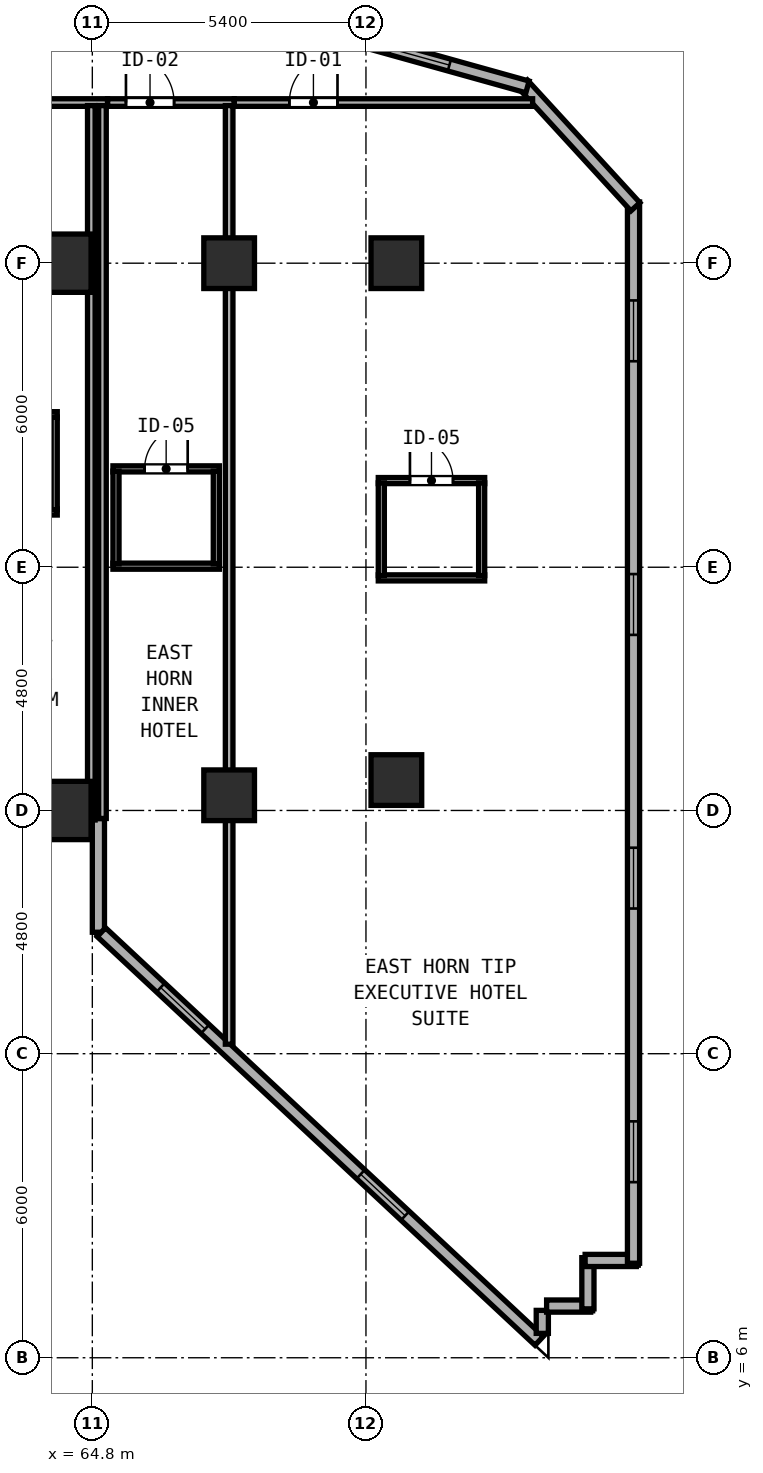
"""IFC4 building model, lengths in metres.
Left out: names, types, materials, properties, quantities, classifications, styles, units other than length and angle.
Written with IfcOpenShell. Run it as: python <this file> out.ifc"""

import sys

from ifc_helpers import new_model, si_unit, direction, frame, frame_2d, origin, origin_2d, place, context, subcontext, project, spatial, rectangle, hollow_rectangle, extrude, element, fill, save


model = new_model("IFC4")
c1 = context("Model", 3, precision=1e-05, world=origin(), true_north=direction((0.0, 1.0)))
c2 = subcontext(c1, "Body", "Model", "MODEL_VIEW")
j1 = project(units=[si_unit("LENGTHUNIT", "METRE"), si_unit("PLANEANGLEUNIT", "RADIAN")], contexts=[c1])
p1 = place(None, origin())
s1 = spatial("IfcSite", under=j1, at=p1, CompositionType="ELEMENT")
p2 = place(p1, origin())
s2 = spatial("IfcBuilding", under=s1, at=p2, CompositionType="ELEMENT")
p3 = place(p2, frame((0.0, 0.0, 85.6)))
s3 = spatial("IfcBuildingStorey", under=s2, at=p3, CompositionType="ELEMENT", Elevation=85.6)
for number, where, z_axis, x_axis in (
    (1, (64.2, 16.8, 0.0), (0.0, 0.0, 1.0), (1.0, 0.0, 0.0)),
    (2, (64.2, 27.6, 0.0), (0.0, 0.0, 1.0), (1.0, 0.0, 0.0)),
):
    element("IfcColumn", number, at=place(p3, frame(where, z_axis=z_axis, x_axis=x_axis)), inside=s3, PredefinedType="COLUMN", context=c2, shape_type="SweptSolid", body=[
        extrude(hollow_rectangle(XDim=1.15, YDim=1.15, WallThickness=0.042, at=origin_2d()), origin(), (0.0, 0.0, 1.0), 3.8),
    ])
for number, where, z_axis, x_axis in (
    (3, (70.8, 17.4, 0.0), (0.0, 0.0, 1.0), (1.0, 0.0, 0.0)),
    (4, (70.8, 27.6, 0.0), (0.0, 0.0, 1.0), (1.0, 0.0, 0.0)),
    (5, (67.5, 17.1, 0.0), (0.0, 0.0, 1.0), (1.0, 0.0, 0.0)),
    (6, (67.5, 27.6, 0.0), (0.0, 0.0, 1.0), (1.0, 0.0, 0.0)),
):
    element("IfcColumn", number, at=place(p3, frame(where, z_axis=z_axis, x_axis=x_axis)), inside=s3, PredefinedType="COLUMN", context=c2, shape_type="SweptSolid", body=[
        extrude(hollow_rectangle(XDim=1.0, YDim=1.0, WallThickness=0.038, at=origin_2d()), origin(), (0.0, 0.0, 1.0), 3.8),
    ])
p4 = place(p3, frame((64.92, 16.64, 0.0), z_axis=(0.0, 0.0, 1.0), x_axis=(0.0, -1.0, 0.0)))
e7 = element("IfcWall", 7, at=p4, inside=s3, PredefinedType="SOLIDWALL", context=c2, shape_type="SweptSolid", body=[
    extrude(rectangle(XDim=2.243, YDim=0.24, at=frame_2d((1.121, 0.0))), origin(), (0.0, 0.0, 1.0), 3.54),
])
p5 = place(p3, frame((64.979, 14.397, 0.0), z_axis=(0.0, 0.0, 1.0), x_axis=(0.731053894258, -0.682319722484, 0.0)))
e8 = element("IfcWall", 8, at=p5, inside=s3, PredefinedType="SOLIDWALL", context=c2, shape_type="SweptSolid", body=[
    extrude(rectangle(XDim=11.818, YDim=0.24, at=frame_2d((5.909, 0.0))), origin(), (0.0, 0.0, 1.0), 3.54),
])
p6 = place(p5, frame((1.6, 0.0, 0.85)))
e9 = element("IfcOpeningElement", 9, at=p6, cuts=e8, PredefinedType="OPENING", context=c2, shape_type="SweptSolid", body=[
    extrude(rectangle(XDim=1.2, YDim=1.85, at=frame_2d((0.6, 0.925))), frame((0.0, 0.13, 0.0), z_axis=(0.0, -1.0, 0.0), x_axis=(1.0, 0.0, 0.0)), (0.0, 0.0, 1.0), 0.26),
])
p7 = place(p5, frame((7.0, 0.0, 0.85)))
e10 = element("IfcOpeningElement", 10, at=p7, cuts=e8, PredefinedType="OPENING", context=c2, shape_type="SweptSolid", body=[
    extrude(rectangle(XDim=1.2, YDim=1.85, at=frame_2d((0.6, 0.925))), frame((0.0, 0.13, 0.0), z_axis=(0.0, -1.0, 0.0), x_axis=(1.0, 0.0, 0.0)), (0.0, 0.0, 1.0), 0.26),
])
p8 = place(p3, frame((73.68, 6.481, 0.0), z_axis=(0.0, 0.0, 1.0), x_axis=(0.0, 1.0, 0.0)))
e11 = element("IfcWall", 11, at=p8, inside=s3, PredefinedType="SOLIDWALL", context=c2, shape_type="SweptSolid", body=[
    extrude(rectangle(XDim=0.454, YDim=0.24, at=frame_2d((0.227, 0.0))), origin(), (0.0, 0.0, 1.0), 3.54),
])
p9 = place(p3, frame((73.765, 7.02, 0.0), z_axis=(0.0, 0.0, 1.0), x_axis=(1.0, 0.0, 0.0)))
e12 = element("IfcWall", 12, at=p9, inside=s3, PredefinedType="SOLIDWALL", context=c2, shape_type="SweptSolid", body=[
    extrude(rectangle(XDim=0.87, YDim=0.24, at=frame_2d((0.435, 0.0))), origin(), (0.0, 0.0, 1.0), 3.54),
])
for number, where, z_axis, x_axis in (
    (13, (74.58, 6.965, 0.0), (0.0, 0.0, 1.0), (0.0, 1.0, 0.0)),
    (14, (74.525, 7.92, 0.0), (0.0, 0.0, 1.0), (1.0, 0.0, 0.0)),
):
    element("IfcWall", number, at=place(p3, frame(where, z_axis=z_axis, x_axis=x_axis)), inside=s3, PredefinedType="SOLIDWALL", context=c2, shape_type="SweptSolid", body=[
        extrude(rectangle(XDim=1.01, YDim=0.24, at=frame_2d((0.505, 0.0))), origin(), (0.0, 0.0, 1.0), 3.54),
    ])
p10 = place(p3, frame((75.48, 7.865, 0.0), z_axis=(0.0, 0.0, 1.0), x_axis=(0.0, 1.0, 0.0)))
e15 = element("IfcWall", 15, at=p10, inside=s3, PredefinedType="SOLIDWALL", context=c2, shape_type="SweptSolid", body=[
    extrude(rectangle(XDim=20.943, YDim=0.24, at=frame_2d((10.472, 0.0))), origin(), (0.0, 0.0, 1.0), 3.54),
])
p11 = place(p10, frame((1.6, 0.0, 0.85)))
e16 = element("IfcOpeningElement", 16, at=p11, cuts=e15, PredefinedType="OPENING", context=c2, shape_type="SweptSolid", body=[
    extrude(rectangle(XDim=1.2, YDim=1.85, at=frame_2d((0.6, 0.925))), frame((0.0, 0.13, 0.0), z_axis=(0.0, -1.0, 0.0), x_axis=(1.0, 0.0, 0.0)), (0.0, 0.0, 1.0), 0.26),
])
p12 = place(p10, frame((7.0, 0.0, 0.85)))
e17 = element("IfcOpeningElement", 17, at=p12, cuts=e15, PredefinedType="OPENING", context=c2, shape_type="SweptSolid", body=[
    extrude(rectangle(XDim=1.2, YDim=1.85, at=frame_2d((0.6, 0.925))), frame((0.0, 0.13, 0.0), z_axis=(0.0, -1.0, 0.0), x_axis=(1.0, 0.0, 0.0)), (0.0, 0.0, 1.0), 0.26),
])
p13 = place(p10, frame((12.4, 0.0, 0.85)))
e18 = element("IfcOpeningElement", 18, at=p13, cuts=e15, PredefinedType="OPENING", context=c2, shape_type="SweptSolid", body=[
    extrude(rectangle(XDim=1.2, YDim=1.85, at=frame_2d((0.6, 0.925))), frame((0.0, 0.13, 0.0), z_axis=(0.0, -1.0, 0.0), x_axis=(1.0, 0.0, 0.0)), (0.0, 0.0, 1.0), 0.26),
])
p14 = place(p10, frame((17.8, 0.0, 0.85)))
e19 = element("IfcOpeningElement", 19, at=p14, cuts=e15, PredefinedType="OPENING", context=c2, shape_type="SweptSolid", body=[
    extrude(rectangle(XDim=1.2, YDim=1.85, at=frame_2d((0.6, 0.925))), frame((0.0, 0.13, 0.0), z_axis=(0.0, -1.0, 0.0), x_axis=(1.0, 0.0, 0.0)), (0.0, 0.0, 1.0), 0.26),
])
p15 = place(p3, frame((75.517, 28.713, 0.0), z_axis=(0.0, 0.0, 1.0), x_axis=(-0.67574145796, 0.737138712858, 0.0)))
e20 = element("IfcWall", 20, at=p15, inside=s3, PredefinedType="SOLIDWALL", context=c2, shape_type="SweptSolid", body=[
    extrude(rectangle(XDim=3.284, YDim=0.24, at=frame_2d((1.642, 0.0))), origin(), (0.0, 0.0, 1.0), 3.54),
])
p16 = place(p3, frame((73.388, 31.079, 0.0), z_axis=(0.0, 0.0, 1.0), x_axis=(-0.963197271032, 0.268795493036, 0.0)))
e21 = element("IfcWall", 21, at=p16, inside=s3, PredefinedType="SOLIDWALL", context=c2, shape_type="SweptSolid", body=[
    extrude(rectangle(XDim=9.095, YDim=0.24, at=frame_2d((4.548, 0.0))), origin(), (0.0, 0.0, 1.0), 3.54),
])
p17 = place(p16, frame((1.6, 0.0, 0.85)))
e22 = element("IfcOpeningElement", 22, at=p17, cuts=e21, PredefinedType="OPENING", context=c2, shape_type="SweptSolid", body=[
    extrude(rectangle(XDim=1.2, YDim=1.85, at=frame_2d((0.6, 0.925))), frame((0.0, 0.13, 0.0), z_axis=(0.0, -1.0, 0.0), x_axis=(1.0, 0.0, 0.0)), (0.0, 0.0, 1.0), 0.26),
])
p18 = place(p16, frame((7.0, 0.0, 0.85)))
e23 = element("IfcOpeningElement", 23, at=p18, cuts=e21, PredefinedType="OPENING", context=c2, shape_type="SweptSolid", body=[
    extrude(rectangle(XDim=1.2, YDim=1.85, at=frame_2d((0.6, 0.925))), frame((0.0, 0.13, 0.0), z_axis=(0.0, -1.0, 0.0), x_axis=(1.0, 0.0, 0.0)), (0.0, 0.0, 1.0), 0.26),
])
p19 = place(p3, frame((61.202, 30.77, 0.0), z_axis=(0.0, 0.0, 1.0), x_axis=(1.0, 0.0, 0.0)))
e24 = element("IfcWall", 24, at=p19, inside=s3, PredefinedType="PARTITIONING", context=c2, shape_type="SweptSolid", body=[
    extrude(rectangle(XDim=3.898, YDim=0.15, at=frame_2d((1.949, 0.0))), origin(), (0.0, 0.0, 1.0), 3.54),
])
p20 = place(p19, frame((1.09, 0.0, 0.0), z_axis=(0.0, 0.0, 1.0), x_axis=(-1.0, 0.0, 0.0)))
e25 = element("IfcOpeningElement", 25, at=p20, cuts=e24, PredefinedType="OPENING", context=c2, shape_type="SweptSolid", body=[
    extrude(rectangle(XDim=0.95, YDim=2.15, at=frame_2d((0.475, 1.075))), frame((0.0, 0.085, 0.0), z_axis=(0.0, -1.0, 0.0), x_axis=(1.0, 0.0, 0.0)), (0.0, 0.0, 1.0), 0.17),
])
p21 = place(p3, frame((65.0, 16.642, 0.0), z_axis=(0.0, 0.0, 1.0), x_axis=(0.0, 1.0, 0.0)))
e26 = element("IfcWall", 26, at=p21, inside=s3, PredefinedType="PARTITIONING", context=c2, shape_type="SweptSolid", body=[
    extrude(rectangle(XDim=14.068, YDim=0.15, at=frame_2d((7.034, 0.0))), origin(), (0.0, 0.0, 1.0), 3.54),
])
p22 = place(p3, frame((62.008, 24.61, 0.0), z_axis=(0.0, 0.0, 1.0), x_axis=(1.0, 0.0, 0.0)))
e27 = element("IfcWall", 27, at=p22, inside=s3, PredefinedType="PARTITIONING", context=c2, shape_type="SweptSolid", body=[
    extrude(rectangle(XDim=2.1, YDim=0.12, at=frame_2d((1.05, 0.0))), origin(), (0.0, 0.0, 1.0), 3.54),
])
p23 = place(p22, frame((1.475, 0.0, 0.0), z_axis=(0.0, 0.0, 1.0), x_axis=(-1.0, 0.0, 0.0)))
e28 = element("IfcOpeningElement", 28, at=p23, cuts=e27, PredefinedType="OPENING", context=c2, shape_type="SweptSolid", body=[
    extrude(rectangle(XDim=0.85, YDim=2.1, at=frame_2d((0.425, 1.05))), frame((0.0, 0.07, 0.0), z_axis=(0.0, -1.0, 0.0), x_axis=(1.0, 0.0, 0.0)), (0.0, 0.0, 1.0), 0.14),
])
p24 = place(p3, frame((62.008, 22.69, 0.0), z_axis=(0.0, 0.0, 1.0), x_axis=(1.0, 0.0, 0.0)))
e29 = element("IfcWall", 29, at=p24, inside=s3, PredefinedType="PARTITIONING", context=c2, shape_type="SweptSolid", body=[
    extrude(rectangle(XDim=2.1, YDim=0.12, at=frame_2d((1.05, 0.0))), origin(), (0.0, 0.0, 1.0), 3.54),
])
p25 = place(p3, frame((64.048, 22.735, 0.0), z_axis=(0.0, 0.0, 1.0), x_axis=(0.0, 1.0, 0.0)))
e30 = element("IfcWall", 30, at=p25, inside=s3, PredefinedType="PARTITIONING", context=c2, shape_type="SweptSolid", body=[
    extrude(rectangle(XDim=1.83, YDim=0.12, at=frame_2d((0.915, 0.0))), origin(), (0.0, 0.0, 1.0), 3.037),
])
p26 = place(p3, frame((65.102, 30.77, 0.0), z_axis=(0.0, 0.0, 1.0), x_axis=(1.0, 0.0, 0.0)))
e31 = element("IfcWall", 31, at=p26, inside=s3, PredefinedType="PARTITIONING", context=c2, shape_type="SweptSolid", body=[
    extrude(rectangle(XDim=2.498, YDim=0.15, at=frame_2d((1.249, 0.0))), origin(), (0.0, 0.0, 1.0), 3.54),
])
p27 = place(p26, frame((1.312, 0.0, 0.0), z_axis=(0.0, 0.0, 1.0), x_axis=(-1.0, 0.0, 0.0)))
e32 = element("IfcOpeningElement", 32, at=p27, cuts=e31, PredefinedType="OPENING", context=c2, shape_type="SweptSolid", body=[
    extrude(rectangle(XDim=0.95, YDim=2.15, at=frame_2d((0.475, 1.075))), frame((0.0, 0.085, 0.0), z_axis=(0.0, -1.0, 0.0), x_axis=(1.0, 0.0, 0.0)), (0.0, 0.0, 1.0), 0.17),
])
p28 = place(p3, frame((67.5, 12.188, 0.0), z_axis=(0.0, 0.0, 1.0), x_axis=(0.0, 1.0, 0.0)))
e33 = element("IfcWall", 33, at=p28, inside=s3, PredefinedType="PARTITIONING", context=c2, shape_type="SweptSolid", body=[
    extrude(rectangle(XDim=18.522, YDim=0.15, at=frame_2d((9.261, 0.0))), origin(), (0.0, 0.0, 1.0), 3.54),
])
p29 = place(p3, frame((64.78, 16.612, 0.0), z_axis=(0.0, 0.0, 1.0), x_axis=(0.0, 1.0, 0.0)))
e34 = element("IfcWall", 34, at=p29, inside=s3, PredefinedType="PARTITIONING", context=c2, shape_type="SweptSolid", body=[
    extrude(rectangle(XDim=14.098, YDim=0.15, at=frame_2d((7.049, 0.0))), origin(), (0.0, 0.0, 1.0), 3.54),
])
p30 = place(p3, frame((65.207, 23.541, 0.0), z_axis=(0.0, 0.0, 1.0), x_axis=(1.0, 0.0, 0.0)))
e35 = element("IfcWall", 35, at=p30, inside=s3, PredefinedType="PARTITIONING", context=c2, shape_type="SweptSolid", body=[
    extrude(rectangle(XDim=2.1, YDim=0.12, at=frame_2d((1.05, 0.0))), origin(), (0.0, 0.0, 1.0), 3.54),
])
p31 = place(p30, frame((1.475, 0.0, 0.0), z_axis=(0.0, 0.0, 1.0), x_axis=(-1.0, 0.0, 0.0)))
e36 = element("IfcOpeningElement", 36, at=p31, cuts=e35, PredefinedType="OPENING", context=c2, shape_type="SweptSolid", body=[
    extrude(rectangle(XDim=0.85, YDim=2.1, at=frame_2d((0.425, 1.05))), frame((0.0, 0.07, 0.0), z_axis=(0.0, -1.0, 0.0), x_axis=(1.0, 0.0, 0.0)), (0.0, 0.0, 1.0), 0.14),
])
p32 = place(p3, frame((65.207, 21.621, 0.0), z_axis=(0.0, 0.0, 1.0), x_axis=(1.0, 0.0, 0.0)))
e37 = element("IfcWall", 37, at=p32, inside=s3, PredefinedType="PARTITIONING", context=c2, shape_type="SweptSolid", body=[
    extrude(rectangle(XDim=2.1, YDim=0.12, at=frame_2d((1.05, 0.0))), origin(), (0.0, 0.0, 1.0), 3.54),
])
for number, where, z_axis, x_axis in (
    (38, (65.267, 21.666, 0.0), (0.0, 0.0, 1.0), (0.0, 1.0, 0.0)),
    (39, (67.247, 21.666, 0.0), (0.0, 0.0, 1.0), (0.0, 1.0, 0.0)),
):
    element("IfcWall", number, at=place(p3, frame(where, z_axis=z_axis, x_axis=x_axis)), inside=s3, PredefinedType="PARTITIONING", context=c2, shape_type="SweptSolid", body=[
        extrude(rectangle(XDim=1.83, YDim=0.12, at=frame_2d((0.915, 0.0))), origin(), (0.0, 0.0, 1.0), 3.54),
    ])
p33 = place(p3, frame((67.602, 30.77, 0.0), z_axis=(0.0, 0.0, 1.0), x_axis=(1.0, 0.0, 0.0)))
e40 = element("IfcWall", 40, at=p33, inside=s3, PredefinedType="PARTITIONING", context=c2, shape_type="SweptSolid", body=[
    extrude(rectangle(XDim=5.887, YDim=0.15, at=frame_2d((2.943, 0.0))), origin(), (0.0, 0.0, 1.0), 3.54),
])
p34 = place(p33, frame((2.036, 0.0, 0.0), z_axis=(0.0, 0.0, 1.0), x_axis=(-1.0, 0.0, 0.0)))
e41 = element("IfcOpeningElement", 41, at=p34, cuts=e40, PredefinedType="OPENING", context=c2, shape_type="SweptSolid", body=[
    extrude(rectangle(XDim=0.95, YDim=2.18, at=frame_2d((0.475, 1.09))), frame((0.0, 0.085, 0.0), z_axis=(0.0, -1.0, 0.0), x_axis=(1.0, 0.0, 0.0)), (0.0, 0.0, 1.0), 0.17),
])
p35 = place(p3, frame((70.443, 23.31, 0.0), z_axis=(0.0, 0.0, 1.0), x_axis=(1.0, 0.0, 0.0)))
e42 = element("IfcWall", 42, at=p35, inside=s3, PredefinedType="PARTITIONING", context=c2, shape_type="SweptSolid", body=[
    extrude(rectangle(XDim=2.1, YDim=0.12, at=frame_2d((1.05, 0.0))), origin(), (0.0, 0.0, 1.0), 3.54),
])
p36 = place(p35, frame((1.475, 0.0, 0.0), z_axis=(0.0, 0.0, 1.0), x_axis=(-1.0, 0.0, 0.0)))
e43 = element("IfcOpeningElement", 43, at=p36, cuts=e42, PredefinedType="OPENING", context=c2, shape_type="SweptSolid", body=[
    extrude(rectangle(XDim=0.85, YDim=2.1, at=frame_2d((0.425, 1.05))), frame((0.0, 0.07, 0.0), z_axis=(0.0, -1.0, 0.0), x_axis=(1.0, 0.0, 0.0)), (0.0, 0.0, 1.0), 0.14),
])
p37 = place(p3, frame((70.443, 21.39, 0.0), z_axis=(0.0, 0.0, 1.0), x_axis=(1.0, 0.0, 0.0)))
e44 = element("IfcWall", 44, at=p37, inside=s3, PredefinedType="PARTITIONING", context=c2, shape_type="SweptSolid", body=[
    extrude(rectangle(XDim=2.1, YDim=0.12, at=frame_2d((1.05, 0.0))), origin(), (0.0, 0.0, 1.0), 3.54),
])
for number, where, z_axis, x_axis in (
    (45, (70.503, 21.435, 0.0), (0.0, 0.0, 1.0), (0.0, 1.0, 0.0)),
    (46, (72.483, 21.435, 0.0), (0.0, 0.0, 1.0), (0.0, 1.0, 0.0)),
):
    element("IfcWall", number, at=place(p3, frame(where, z_axis=z_axis, x_axis=x_axis)), inside=s3, PredefinedType="PARTITIONING", context=c2, shape_type="SweptSolid", body=[
        extrude(rectangle(XDim=1.83, YDim=0.12, at=frame_2d((0.915, 0.0))), origin(), (0.0, 0.0, 1.0), 3.54),
    ])
p38 = place(p6, origin())
e47 = element("IfcWindow", 47, at=p38, inside=s3, PartitioningType="SINGLE_PANEL", PredefinedType="WINDOW", context=c2, shape_type="SweptSolid", body=[
    extrude(rectangle(XDim=1.2, YDim=1.85, at=frame_2d((0.6, 0.925))), frame((0.0, 0.03, 0.0), z_axis=(0.0, -1.0, 0.0), x_axis=(1.0, 0.0, 0.0)), (0.0, 0.0, 1.0), 0.06),
])
fill(e9, e47)
p39 = place(p7, origin())
e48 = element("IfcWindow", 48, at=p39, inside=s3, PartitioningType="SINGLE_PANEL", PredefinedType="WINDOW", context=c2, shape_type="SweptSolid", body=[
    extrude(rectangle(XDim=1.2, YDim=1.85, at=frame_2d((0.6, 0.925))), frame((0.0, 0.03, 0.0), z_axis=(0.0, -1.0, 0.0), x_axis=(1.0, 0.0, 0.0)), (0.0, 0.0, 1.0), 0.06),
])
fill(e10, e48)
p40 = place(p11, origin())
e49 = element("IfcWindow", 49, at=p40, inside=s3, PartitioningType="SINGLE_PANEL", PredefinedType="WINDOW", context=c2, shape_type="SweptSolid", body=[
    extrude(rectangle(XDim=1.2, YDim=1.85, at=frame_2d((0.6, 0.925))), frame((0.0, 0.03, 0.0), z_axis=(0.0, -1.0, 0.0), x_axis=(1.0, 0.0, 0.0)), (0.0, 0.0, 1.0), 0.06),
])
fill(e16, e49)
p41 = place(p12, origin())
e50 = element("IfcWindow", 50, at=p41, inside=s3, PartitioningType="SINGLE_PANEL", PredefinedType="WINDOW", context=c2, shape_type="SweptSolid", body=[
    extrude(rectangle(XDim=1.2, YDim=1.85, at=frame_2d((0.6, 0.925))), frame((0.0, 0.03, 0.0), z_axis=(0.0, -1.0, 0.0), x_axis=(1.0, 0.0, 0.0)), (0.0, 0.0, 1.0), 0.06),
])
fill(e17, e50)
p42 = place(p13, origin())
e51 = element("IfcWindow", 51, at=p42, inside=s3, PartitioningType="SINGLE_PANEL", PredefinedType="WINDOW", context=c2, shape_type="SweptSolid", body=[
    extrude(rectangle(XDim=1.2, YDim=1.85, at=frame_2d((0.6, 0.925))), frame((0.0, 0.03, 0.0), z_axis=(0.0, -1.0, 0.0), x_axis=(1.0, 0.0, 0.0)), (0.0, 0.0, 1.0), 0.06),
])
fill(e18, e51)
p43 = place(p14, origin())
e52 = element("IfcWindow", 52, at=p43, inside=s3, PartitioningType="SINGLE_PANEL", PredefinedType="WINDOW", context=c2, shape_type="SweptSolid", body=[
    extrude(rectangle(XDim=1.2, YDim=1.85, at=frame_2d((0.6, 0.925))), frame((0.0, 0.03, 0.0), z_axis=(0.0, -1.0, 0.0), x_axis=(1.0, 0.0, 0.0)), (0.0, 0.0, 1.0), 0.06),
])
fill(e19, e52)
p44 = place(p17, origin())
e53 = element("IfcWindow", 53, at=p44, inside=s3, PartitioningType="SINGLE_PANEL", PredefinedType="WINDOW", context=c2, shape_type="SweptSolid", body=[
    extrude(rectangle(XDim=1.2, YDim=1.85, at=frame_2d((0.6, 0.925))), frame((0.0, 0.03, 0.0), z_axis=(0.0, -1.0, 0.0), x_axis=(1.0, 0.0, 0.0)), (0.0, 0.0, 1.0), 0.06),
])
fill(e22, e53)
p45 = place(p27, origin())
e54 = element("IfcDoor", 54, at=p45, inside=s3, OperationType="SINGLE_SWING_RIGHT", PredefinedType="DOOR", context=c2, shape_type="SweptSolid", body=[
    extrude(rectangle(XDim=0.95, YDim=2.15, at=frame_2d((0.475, 1.075))), frame((0.0, 0.025, 0.0), z_axis=(0.0, -1.0, 0.0), x_axis=(1.0, 0.0, 0.0)), (0.0, 0.0, 1.0), 0.05),
])
fill(e32, e54)
p46 = place(p31, origin())
e55 = element("IfcDoor", 55, at=p46, inside=s3, OperationType="SINGLE_SWING_LEFT", PredefinedType="DOOR", context=c2, shape_type="SweptSolid", body=[
    extrude(rectangle(XDim=0.85, YDim=2.1, at=frame_2d((0.425, 1.05))), frame((0.0, 0.025, 0.0), z_axis=(0.0, -1.0, 0.0), x_axis=(1.0, 0.0, 0.0)), (0.0, 0.0, 1.0), 0.05),
])
fill(e36, e55)
p47 = place(p34, origin())
e56 = element("IfcDoor", 56, at=p47, inside=s3, OperationType="SINGLE_SWING_LEFT", PredefinedType="DOOR", context=c2, shape_type="SweptSolid", body=[
    extrude(rectangle(XDim=0.95, YDim=2.18, at=frame_2d((0.475, 1.09))), frame((0.0, 0.025, 0.0), z_axis=(0.0, -1.0, 0.0), x_axis=(1.0, 0.0, 0.0)), (0.0, 0.0, 1.0), 0.05),
])
fill(e41, e56)
p48 = place(p36, origin())
e57 = element("IfcDoor", 57, at=p48, inside=s3, OperationType="SINGLE_SWING_RIGHT", PredefinedType="DOOR", context=c2, shape_type="SweptSolid", body=[
    extrude(rectangle(XDim=0.85, YDim=2.1, at=frame_2d((0.425, 1.05))), frame((0.0, 0.025, 0.0), z_axis=(0.0, -1.0, 0.0), x_axis=(1.0, 0.0, 0.0)), (0.0, 0.0, 1.0), 0.05),
])
fill(e43, e57)
save(model, sys.argv[1])
